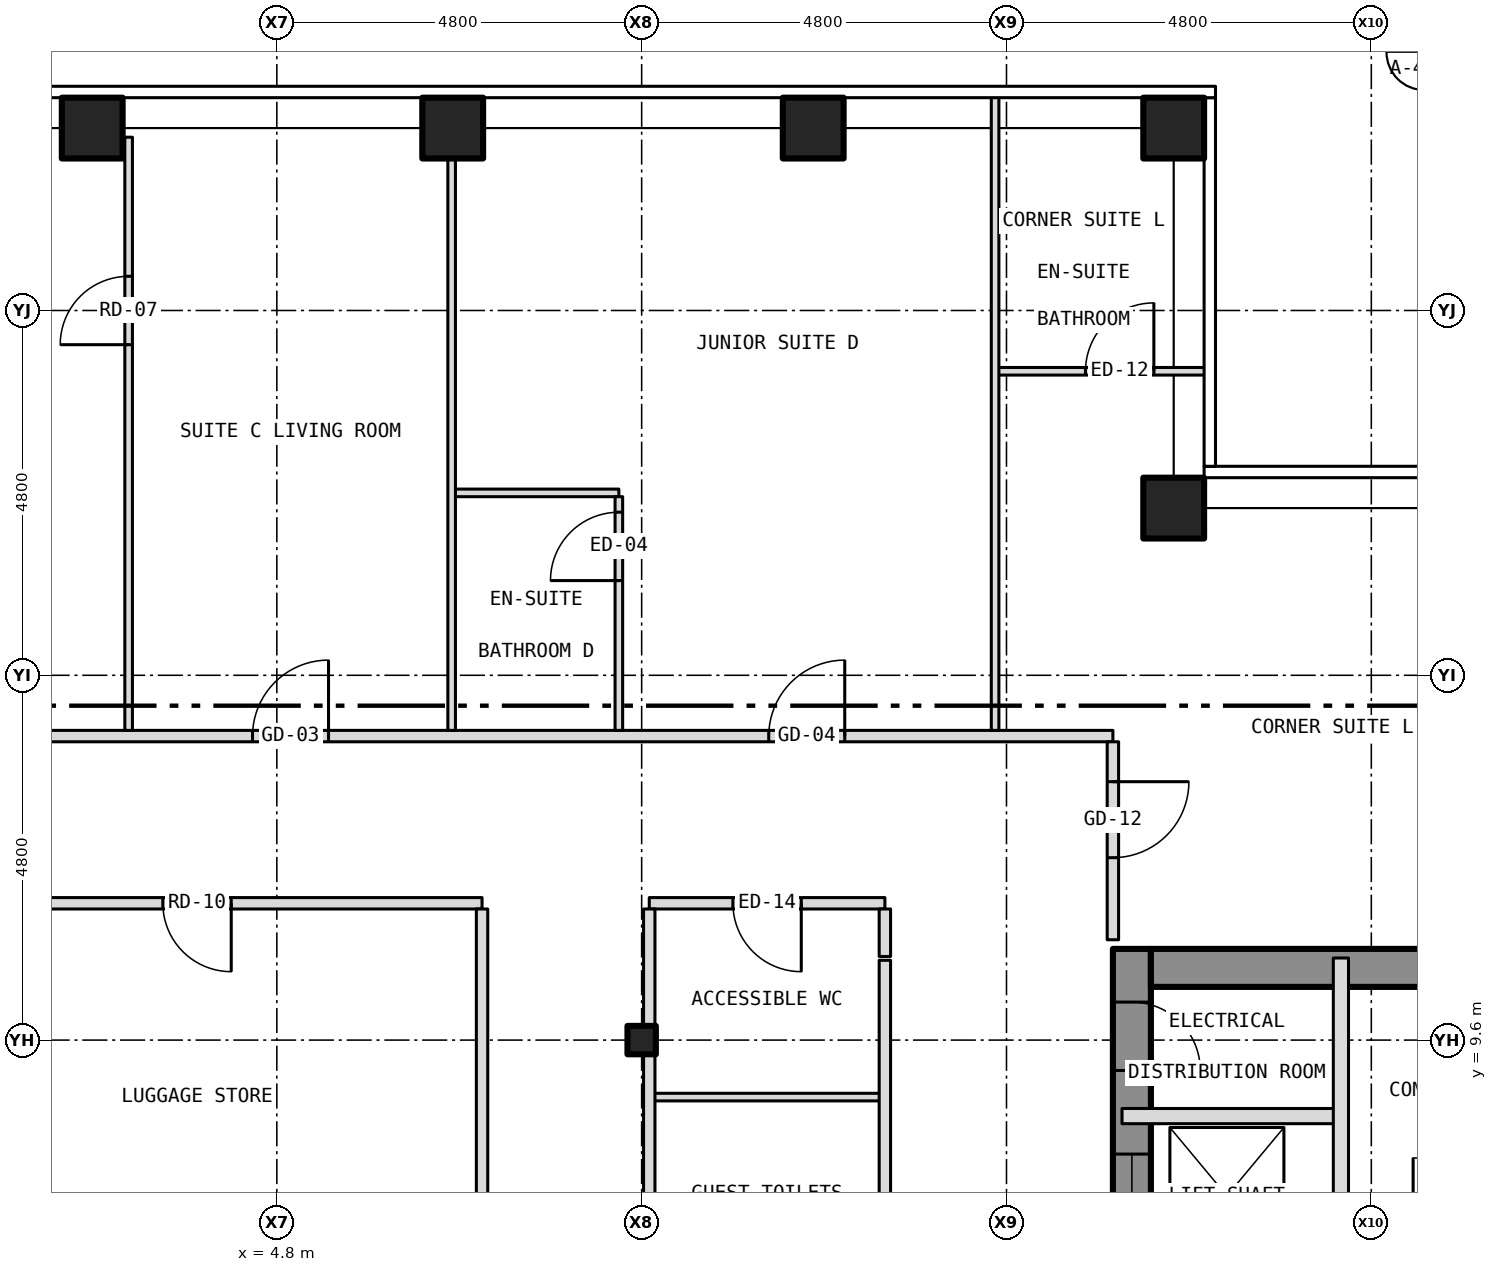
"""IFC4 building model, lengths in metres.
Left out: names, types, materials, properties, quantities, classifications, styles, units other than length and angle.
Written with IfcOpenShell. Run it as: python <this file> out.ifc"""

import sys

from ifc_helpers import new_model, si_unit, direction, frame, frame_2d, origin, origin_2d, place, context, subcontext, project, spatial, rectangle, hollow_rectangle, i_section, extrude, element, fill, save


model = new_model("IFC4")
c1 = context("Model", 3, precision=1e-05, world=origin(), true_north=direction((0.0, 1.0)))
c2 = subcontext(c1, "Body", "Model", "MODEL_VIEW")
j1 = project(units=[si_unit("LENGTHUNIT", "METRE"), si_unit("PLANEANGLEUNIT", "RADIAN")], contexts=[c1])
p1 = place(None, origin())
s1 = spatial("IfcSite", under=j1, at=p1, CompositionType="ELEMENT")
p2 = place(p1, origin())
s2 = spatial("IfcBuilding", under=s1, at=p2, CompositionType="ELEMENT")
p3 = place(p2, frame((0.0, 0.0, 176.0)))
s3 = spatial("IfcBuildingStorey", under=s2, at=p3, CompositionType="ELEMENT", Elevation=176.0)
for number, where, z_axis, x_axis in (
    (1, (2.371, 21.6, -0.15), (0.0, 0.0, 1.0), (1.0, 0.0, 0.0)),
    (2, (7.114, 21.6, -0.15), (0.0, 0.0, 1.0), (1.0, 0.0, 0.0)),
    (3, (11.857, 21.6, -0.15), (0.0, 0.0, 1.0), (1.0, 0.0, 0.0)),
    (4, (16.6, 21.6, -0.15), (0.0, 0.0, 1.0), (1.0, 0.0, 0.0)),
    (5, (16.6, 16.6, -0.15), (0.0, 0.0, 1.0), (1.0, 0.0, 0.0)),
):
    element("IfcColumn", number, at=place(p3, frame(where, z_axis=z_axis, x_axis=x_axis)), inside=s3, PredefinedType="COLUMN", context=c2, shape_type="SweptSolid", body=[
        extrude(hollow_rectangle(XDim=0.8, YDim=0.8, WallThickness=0.045, at=origin_2d()), origin(), (0.0, 0.0, 1.0), 3.5),
    ])
p4 = place(p3, frame((9.6, 9.6, -0.15), z_axis=(0.0, 0.0, 1.0), x_axis=(1.0, 0.0, 0.0)))
e6 = element("IfcColumn", 6, at=p4, inside=s3, PredefinedType="COLUMN", context=c2, shape_type="SweptSolid", body=[
    extrude(i_section(OverallWidth=0.373, OverallDepth=0.373, WebThickness=0.016, FlangeThickness=0.026, at=origin_2d()), origin(), (0.0, 0.0, 1.0), 3.5),
])
p5 = place(p3, frame((16.05, -10.8, 0.0), z_axis=(0.0, 0.0, 1.0), x_axis=(0.0, 1.0, 0.0)))
e7 = element("IfcWall", 7, at=p5, inside=s3, PredefinedType="SHEAR", context=c2, shape_type="SweptSolid", body=[
    extrude(rectangle(XDim=21.6, YDim=0.5, at=frame_2d((10.8, 0.0))), origin(), (0.0, 0.0, 1.0), 3.25),
])
p6 = place(p5, frame((9.4, 0.0, 0.0)))
e8 = element("IfcOpeningElement", 8, at=p6, cuts=e7, PredefinedType="OPENING", context=c2, shape_type="SweptSolid", body=[
    extrude(rectangle(XDim=1.1, YDim=2.1, at=frame_2d((0.55, 1.05))), frame((0.0, 0.262, 0.0), z_axis=(0.0, -1.0, 0.0), x_axis=(1.0, 0.0, 0.0)), (0.0, 0.0, 1.0), 0.524),
])
p7 = place(p5, frame((11.5, 0.0, 0.0)))
e9 = element("IfcOpeningElement", 9, at=p7, cuts=e7, PredefinedType="OPENING", context=c2, shape_type="SweptSolid", body=[
    extrude(rectangle(XDim=1.1, YDim=2.1, at=frame_2d((0.55, 1.05))), frame((0.0, 0.262, 0.0), z_axis=(0.0, -1.0, 0.0), x_axis=(1.0, 0.0, 0.0)), (0.0, 0.0, 1.0), 0.524),
])
p8 = place(p5, frame((13.6, 0.0, 0.0)))
e10 = element("IfcOpeningElement", 10, at=p8, cuts=e7, PredefinedType="OPENING", context=c2, shape_type="SweptSolid", body=[
    extrude(rectangle(XDim=1.1, YDim=2.1, at=frame_2d((0.55, 1.05))), frame((0.0, 0.262, 0.0), z_axis=(0.0, -1.0, 0.0), x_axis=(1.0, 0.0, 0.0)), (0.0, 0.0, 1.0), 0.524),
])
p9 = place(p5, frame((15.7, 0.0, 0.0)))
e11 = element("IfcOpeningElement", 11, at=p9, cuts=e7, PredefinedType="OPENING", context=c2, shape_type="SweptSolid", body=[
    extrude(rectangle(XDim=1.1, YDim=2.1, at=frame_2d((0.55, 1.05))), frame((0.0, 0.262, 0.0), z_axis=(0.0, -1.0, 0.0), x_axis=(1.0, 0.0, 0.0)), (0.0, 0.0, 1.0), 0.524),
])
p10 = place(p5, frame((17.8, 0.0, 0.0)))
e12 = element("IfcOpeningElement", 12, at=p10, cuts=e7, PredefinedType="OPENING", context=c2, shape_type="SweptSolid", body=[
    extrude(rectangle(XDim=1.1, YDim=2.1, at=frame_2d((0.55, 1.05))), frame((0.0, 0.262, 0.0), z_axis=(0.0, -1.0, 0.0), x_axis=(1.0, 0.0, 0.0)), (0.0, 0.0, 1.0), 0.524),
])
p11 = place(p5, frame((5.642, 0.0, 0.0)))
e13 = element("IfcOpeningElement", 13, at=p11, cuts=e7, PredefinedType="OPENING", context=c2, shape_type="SweptSolid", body=[
    extrude(rectangle(XDim=1.1, YDim=2.1, at=frame_2d((0.55, 1.05))), frame((0.0, 0.262, 0.0), z_axis=(0.0, -1.0, 0.0), x_axis=(1.0, 0.0, 0.0)), (0.0, 0.0, 1.0), 0.524),
])
p12 = place(p5, frame((7.5, 0.0, 0.0)))
e14 = element("IfcOpeningElement", 14, at=p12, cuts=e7, PredefinedType="OPENING", context=c2, shape_type="SweptSolid", body=[
    extrude(rectangle(XDim=1.1, YDim=2.1, at=frame_2d((0.55, 1.05))), frame((0.0, 0.262, 0.0), z_axis=(0.0, -1.0, 0.0), x_axis=(1.0, 0.0, 0.0)), (0.0, 0.0, 1.0), 0.524),
])
p13 = place(p5, frame((20.0, 0.0, 0.0)))
e15 = element("IfcOpeningElement", 15, at=p13, cuts=e7, PredefinedType="OPENING", context=c2, shape_type="SweptSolid", body=[
    extrude(rectangle(XDim=0.9, YDim=2.1, at=frame_2d((0.45, 1.05))), frame((0.0, 0.262, 0.0), z_axis=(0.0, -1.0, 0.0), x_axis=(1.0, 0.0, 0.0)), (0.0, 0.0, 1.0), 0.524),
])
p14 = place(p3, frame((16.3, 10.55, 0.0), z_axis=(0.0, 0.0, 1.0), x_axis=(1.0, 0.0, 0.0)))
e16 = element("IfcWall", 16, at=p14, inside=s3, PredefinedType="SHEAR", context=c2, shape_type="SweptSolid", body=[
    extrude(rectangle(XDim=4.8, YDim=0.5, at=frame_2d((2.4, 0.0))), origin(), (0.0, 0.0, 1.0), 3.25),
])
p15 = place(p3, frame((15.92, 8.6, 0.0), z_axis=(0.0, 0.0, 1.0), x_axis=(1.0, 0.0, 0.0)))
e17 = element("IfcWall", 17, at=p15, inside=s3, PredefinedType="PARTITIONING", context=c2, shape_type="SweptSolid", body=[
    extrude(rectangle(XDim=2.88, YDim=0.2, at=frame_2d((1.44, 0.0))), origin(), (0.0, 0.0, 1.0), 3.25),
])
p16 = place(p3, frame((9.7, 8.85, 0.0), z_axis=(0.0, 0.0, 1.0), x_axis=(1.0, 0.0, 0.0)))
e18 = element("IfcWall", 18, at=p16, inside=s3, PredefinedType="PARTITIONING", context=c2, shape_type="SweptSolid", body=[
    extrude(rectangle(XDim=3.1, YDim=0.1, at=frame_2d((1.55, 0.0))), origin(), (0.0, 0.0, 1.0), 3.35),
])
p17 = place(p3, frame((-12.8, 11.4, 0.0), z_axis=(0.0, 0.0, 1.0), x_axis=(1.0, 0.0, 0.0)))
e19 = element("IfcWall", 19, at=p17, inside=s3, PredefinedType="PARTITIONING", context=c2, shape_type="SweptSolid", body=[
    extrude(rectangle(XDim=20.3, YDim=0.15, at=frame_2d((10.15, 0.0))), origin(), (0.0, 0.0, 1.0), 3.35),
])
p18 = place(p17, frame((1.15, 0.0, 0.0)))
e20 = element("IfcOpeningElement", 20, at=p18, cuts=e19, PredefinedType="OPENING", context=c2, shape_type="SweptSolid", body=[
    extrude(rectangle(XDim=0.9, YDim=2.1, at=frame_2d((0.45, 1.05))), frame((0.0, 0.087, 0.0), z_axis=(0.0, -1.0, 0.0), x_axis=(1.0, 0.0, 0.0)), (0.0, 0.0, 1.0), 0.174),
])
p19 = place(p17, frame((16.1, 0.0, 0.0)))
e21 = element("IfcOpeningElement", 21, at=p19, cuts=e19, PredefinedType="OPENING", context=c2, shape_type="SweptSolid", body=[
    extrude(rectangle(XDim=0.9, YDim=2.1, at=frame_2d((0.45, 1.05))), frame((0.0, 0.087, 0.0), z_axis=(0.0, -1.0, 0.0), x_axis=(1.0, 0.0, 0.0)), (0.0, 0.0, 1.0), 0.174),
])
p20 = place(p17, frame((7.55, 0.0, 0.0)))
e22 = element("IfcOpeningElement", 22, at=p20, cuts=e19, PredefinedType="OPENING", context=c2, shape_type="SweptSolid", body=[
    extrude(rectangle(XDim=0.9, YDim=2.1, at=frame_2d((0.45, 1.05))), frame((0.0, 0.087, 0.0), z_axis=(0.0, -1.0, 0.0), x_axis=(1.0, 0.0, 0.0)), (0.0, 0.0, 1.0), 0.174),
])
p21 = place(p3, frame((9.7, 11.4, 0.0), z_axis=(0.0, 0.0, 1.0), x_axis=(1.0, 0.0, 0.0)))
e23 = element("IfcWall", 23, at=p21, inside=s3, PredefinedType="PARTITIONING", context=c2, shape_type="SweptSolid", body=[
    extrude(rectangle(XDim=3.1, YDim=0.15, at=frame_2d((1.55, 0.0))), origin(), (0.0, 0.0, 1.0), 3.35),
])
p22 = place(p21, frame((1.1, 0.0, 0.0)))
e24 = element("IfcOpeningElement", 24, at=p22, cuts=e23, PredefinedType="OPENING", context=c2, shape_type="SweptSolid", body=[
    extrude(rectangle(XDim=0.9, YDim=2.1, at=frame_2d((0.45, 1.05))), frame((0.0, 0.087, 0.0), z_axis=(0.0, -1.0, 0.0), x_axis=(1.0, 0.0, 0.0)), (0.0, 0.0, 1.0), 0.174),
])
p23 = place(p3, frame((-15.8, 13.6, 0.0), z_axis=(0.0, 0.0, 1.0), x_axis=(1.0, 0.0, 0.0)))
e25 = element("IfcWall", 25, at=p23, inside=s3, PredefinedType="PARTITIONING", context=c2, shape_type="SweptSolid", body=[
    extrude(rectangle(XDim=31.6, YDim=0.15, at=frame_2d((15.8, 0.0))), origin(), (0.0, 0.0, 1.0), 3.35),
])
p24 = place(p23, frame((4.543, 0.0, 0.0)))
e26 = element("IfcOpeningElement", 26, at=p24, cuts=e25, PredefinedType="OPENING", context=c2, shape_type="SweptSolid", body=[
    extrude(rectangle(XDim=1.0, YDim=2.1, at=frame_2d((0.5, 1.05))), frame((0.0, 0.087, 0.0), z_axis=(0.0, -1.0, 0.0), x_axis=(1.0, 0.0, 0.0)), (0.0, 0.0, 1.0), 0.174),
])
p25 = place(p23, frame((8.271, 0.0, 0.0)))
e27 = element("IfcOpeningElement", 27, at=p25, cuts=e25, PredefinedType="OPENING", context=c2, shape_type="SweptSolid", body=[
    extrude(rectangle(XDim=1.0, YDim=2.1, at=frame_2d((0.5, 1.05))), frame((0.0, 0.087, 0.0), z_axis=(0.0, -1.0, 0.0), x_axis=(1.0, 0.0, 0.0)), (0.0, 0.0, 1.0), 0.174),
])
p26 = place(p23, frame((20.28, 0.0, 0.0)))
e28 = element("IfcOpeningElement", 28, at=p26, cuts=e25, PredefinedType="OPENING", context=c2, shape_type="SweptSolid", body=[
    extrude(rectangle(XDim=1.0, YDim=2.1, at=frame_2d((0.5, 1.05))), frame((0.0, 0.087, 0.0), z_axis=(0.0, -1.0, 0.0), x_axis=(1.0, 0.0, 0.0)), (0.0, 0.0, 1.0), 0.174),
])
p27 = place(p23, frame((27.072, 0.0, 0.0)))
e29 = element("IfcOpeningElement", 29, at=p27, cuts=e25, PredefinedType="OPENING", context=c2, shape_type="SweptSolid", body=[
    extrude(rectangle(XDim=1.0, YDim=2.1, at=frame_2d((0.5, 1.05))), frame((0.0, 0.087, 0.0), z_axis=(0.0, -1.0, 0.0), x_axis=(1.0, 0.0, 0.0)), (0.0, 0.0, 1.0), 0.174),
])
p28 = place(p3, frame((7.1, 16.8, 0.0), z_axis=(0.0, 0.0, 1.0), x_axis=(1.0, 0.0, 0.0)))
e30 = element("IfcWall", 30, at=p28, inside=s3, PredefinedType="PARTITIONING", context=c2, shape_type="SweptSolid", body=[
    extrude(rectangle(XDim=2.2, YDim=0.1, at=frame_2d((1.1, 0.0))), origin(), (0.0, 0.0, 1.0), 3.35),
])
p29 = place(p3, frame((14.25, 18.4, 0.0), z_axis=(0.0, 0.0, 1.0), x_axis=(1.0, 0.0, 0.0)))
e31 = element("IfcWall", 31, at=p29, inside=s3, PredefinedType="PARTITIONING", context=c2, shape_type="SweptSolid", body=[
    extrude(rectangle(XDim=2.78, YDim=0.1, at=frame_2d((1.39, 0.0))), origin(), (0.0, 0.0, 1.0), 3.35),
])
p30 = place(p29, frame((1.189, 0.0, 0.0)))
e32 = element("IfcOpeningElement", 32, at=p30, cuts=e31, PredefinedType="OPENING", context=c2, shape_type="SweptSolid", body=[
    extrude(rectangle(XDim=0.9, YDim=2.1, at=frame_2d((0.45, 1.05))), frame((0.0, 0.062, 0.0), z_axis=(0.0, -1.0, 0.0), x_axis=(1.0, 0.0, 0.0)), (0.0, 0.0, 1.0), 0.124),
])
p31 = place(p3, frame((2.85, 13.675, 0.0), z_axis=(0.0, 0.0, 1.0), x_axis=(0.0, 1.0, 0.0)))
e33 = element("IfcWall", 33, at=p31, inside=s3, PredefinedType="PARTITIONING", context=c2, shape_type="SweptSolid", body=[
    extrude(rectangle(XDim=7.805, YDim=0.1, at=frame_2d((3.902, 0.0))), origin(), (0.0, 0.0, 1.0), 3.35),
])
p32 = place(p31, frame((5.075, 0.0, 0.0)))
e34 = element("IfcOpeningElement", 34, at=p32, cuts=e33, PredefinedType="OPENING", context=c2, shape_type="SweptSolid", body=[
    extrude(rectangle(XDim=0.9, YDim=2.1, at=frame_2d((0.45, 1.05))), frame((0.0, 0.062, 0.0), z_axis=(0.0, -1.0, 0.0), x_axis=(1.0, 0.0, 0.0)), (0.0, 0.0, 1.0), 0.124),
])
p33 = place(p3, frame((7.1, 13.675, 0.0), z_axis=(0.0, 0.0, 1.0), x_axis=(0.0, 1.0, 0.0)))
e35 = element("IfcWall", 35, at=p33, inside=s3, PredefinedType="PARTITIONING", context=c2, shape_type="SweptSolid", body=[
    extrude(rectangle(XDim=7.805, YDim=0.1, at=frame_2d((3.902, 0.0))), origin(), (0.0, 0.0, 1.0), 3.35),
])
p34 = place(p3, frame((7.5, 6.375, 0.0), z_axis=(0.0, 0.0, 1.0), x_axis=(0.0, 1.0, 0.0)))
e36 = element("IfcWall", 36, at=p34, inside=s3, PredefinedType="PARTITIONING", context=c2, shape_type="SweptSolid", body=[
    extrude(rectangle(XDim=4.95, YDim=0.15, at=frame_2d((2.475, 0.0))), origin(), (0.0, 0.0, 1.0), 3.35),
])
p35 = place(p3, frame((9.3, 13.675, 0.0), z_axis=(0.0, 0.0, 1.0), x_axis=(0.0, 1.0, 0.0)))
e37 = element("IfcWall", 37, at=p35, inside=s3, PredefinedType="PARTITIONING", context=c2, shape_type="SweptSolid", body=[
    extrude(rectangle(XDim=3.075, YDim=0.1, at=frame_2d((1.538, 0.0))), origin(), (0.0, 0.0, 1.0), 3.35),
])
p36 = place(p35, frame((1.971, 0.0, 0.0)))
e38 = element("IfcOpeningElement", 38, at=p36, cuts=e37, PredefinedType="OPENING", context=c2, shape_type="SweptSolid", body=[
    extrude(rectangle(XDim=0.9, YDim=2.1, at=frame_2d((0.45, 1.05))), frame((0.0, 0.062, 0.0), z_axis=(0.0, -1.0, 0.0), x_axis=(1.0, 0.0, 0.0)), (0.0, 0.0, 1.0), 0.124),
])
p37 = place(p3, frame((9.7, 6.375, 0.0), z_axis=(0.0, 0.0, 1.0), x_axis=(0.0, 1.0, 0.0)))
e39 = element("IfcWall", 39, at=p37, inside=s3, PredefinedType="PARTITIONING", context=c2, shape_type="SweptSolid", body=[
    extrude(rectangle(XDim=3.038, YDim=0.15, at=frame_2d((1.519, 0.0))), origin(), (0.0, 0.0, 1.0), 2.728),
])
p38 = place(p3, frame((9.7, 9.413, 0.0), z_axis=(0.0, 0.0, 1.0), x_axis=(0.0, 1.0, 0.0)))
e40 = element("IfcWall", 40, at=p38, inside=s3, PredefinedType="PARTITIONING", context=c2, shape_type="SweptSolid", body=[
    extrude(rectangle(XDim=0.374, YDim=0.15, at=frame_2d((0.187, 0.0))), origin(), (0.0, 0.0, 1.0), 3.35),
])
p39 = place(p3, frame((9.7, 9.787, 0.0), z_axis=(0.0, 0.0, 1.0), x_axis=(0.0, 1.0, 0.0)))
e41 = element("IfcWall", 41, at=p39, inside=s3, PredefinedType="PARTITIONING", context=c2, shape_type="SweptSolid", body=[
    extrude(rectangle(XDim=1.538, YDim=0.15, at=frame_2d((0.769, 0.0))), origin(), (0.0, 0.0, 1.0), 2.728),
])
p40 = place(p3, frame((12.8, 6.35, 0.0), z_axis=(0.0, 0.0, 1.0), x_axis=(0.0, 1.0, 0.0)))
e42 = element("IfcWall", 42, at=p40, inside=s3, PredefinedType="PARTITIONING", context=c2, shape_type="SweptSolid", body=[
    extrude(rectangle(XDim=4.3, YDim=0.15, at=frame_2d((2.15, 0.0))), origin(), (0.0, 0.0, 1.0), 3.35),
])
p41 = place(p3, frame((12.8, 10.7, 0.0), z_axis=(0.0, 0.0, 1.0), x_axis=(0.0, 1.0, 0.0)))
e43 = element("IfcWall", 43, at=p41, inside=s3, PredefinedType="PARTITIONING", context=c2, shape_type="SweptSolid", body=[
    extrude(rectangle(XDim=0.625, YDim=0.15, at=frame_2d((0.312, 0.0))), origin(), (0.0, 0.0, 1.0), 3.35),
])
p42 = place(p3, frame((14.25, 13.675, 0.0), z_axis=(0.0, 0.0, 1.0), x_axis=(0.0, 1.0, 0.0)))
e44 = element("IfcWall", 44, at=p42, inside=s3, PredefinedType="PARTITIONING", context=c2, shape_type="SweptSolid", body=[
    extrude(rectangle(XDim=8.355, YDim=0.1, at=frame_2d((4.177, 0.0))), origin(), (0.0, 0.0, 1.0), 2.817),
])
p43 = place(p3, frame((15.8, 10.92, 0.0), z_axis=(0.0, 0.0, 1.0), x_axis=(0.0, 1.0, 0.0)))
e45 = element("IfcWall", 45, at=p43, inside=s3, PredefinedType="PARTITIONING", context=c2, shape_type="SweptSolid", body=[
    extrude(rectangle(XDim=2.605, YDim=0.15, at=frame_2d((1.302, 0.0))), origin(), (0.0, 0.0, 1.0), 3.35),
])
p44 = place(p43, frame((1.08, 0.0, 0.0)))
e46 = element("IfcOpeningElement", 46, at=p44, cuts=e45, PredefinedType="OPENING", context=c2, shape_type="SweptSolid", body=[
    extrude(rectangle(XDim=1.0, YDim=2.1, at=frame_2d((0.5, 1.05))), frame((0.0, 0.087, 0.0), z_axis=(0.0, -1.0, 0.0), x_axis=(1.0, 0.0, 0.0)), (0.0, 0.0, 1.0), 0.174),
])
p45 = place(p3, frame((18.8, -1.8, 0.0), z_axis=(0.0, 0.0, 1.0), x_axis=(0.0, 1.0, 0.0)))
e47 = element("IfcWall", 47, at=p45, inside=s3, PredefinedType="PARTITIONING", context=c2, shape_type="SweptSolid", body=[
    extrude(rectangle(XDim=12.48, YDim=0.2, at=frame_2d((6.24, 0.0))), origin(), (0.0, 0.0, 1.0), 3.25),
])
p46 = place(p10, origin())
e48 = element("IfcDoor", 48, at=p46, inside=s3, OperationType="SLIDING_TO_LEFT", PredefinedType="DOOR", context=c2, shape_type="SweptSolid", body=[
    extrude(rectangle(XDim=1.1, YDim=2.1, at=frame_2d((0.55, 1.05))), frame((0.0, 0.025, 0.0), z_axis=(0.0, -1.0, 0.0), x_axis=(1.0, 0.0, 0.0)), (0.0, 0.0, 1.0), 0.05),
])
fill(e12, e48)
p47 = place(p13, origin())
e49 = element("IfcDoor", 49, at=p47, inside=s3, OperationType="SINGLE_SWING_LEFT", PredefinedType="DOOR", context=c2, shape_type="SweptSolid", body=[
    extrude(rectangle(XDim=0.9, YDim=2.1, at=frame_2d((0.45, 1.05))), frame((0.0, 0.025, 0.0), z_axis=(0.0, -1.0, 0.0), x_axis=(1.0, 0.0, 0.0)), (0.0, 0.0, 1.0), 0.05),
])
fill(e15, e49)
p48 = place(p26, origin())
e50 = element("IfcDoor", 50, at=p48, inside=s3, OperationType="SINGLE_SWING_RIGHT", PredefinedType="DOOR", context=c2, shape_type="SweptSolid", body=[
    extrude(rectangle(XDim=1.0, YDim=2.1, at=frame_2d((0.5, 1.05))), frame((0.0, 0.025, 0.0), z_axis=(0.0, -1.0, 0.0), x_axis=(1.0, 0.0, 0.0)), (0.0, 0.0, 1.0), 0.05),
])
fill(e28, e50)
p49 = place(p32, origin())
e51 = element("IfcDoor", 51, at=p49, inside=s3, OperationType="SINGLE_SWING_LEFT", PredefinedType="DOOR", context=c2, shape_type="SweptSolid", body=[
    extrude(rectangle(XDim=0.9, YDim=2.1, at=frame_2d((0.45, 1.05))), frame((0.0, 0.025, 0.0), z_axis=(0.0, -1.0, 0.0), x_axis=(1.0, 0.0, 0.0)), (0.0, 0.0, 1.0), 0.05),
])
fill(e34, e51)
p50 = place(p27, origin())
e52 = element("IfcDoor", 52, at=p50, inside=s3, OperationType="SINGLE_SWING_RIGHT", PredefinedType="DOOR", context=c2, shape_type="SweptSolid", body=[
    extrude(rectangle(XDim=1.0, YDim=2.1, at=frame_2d((0.5, 1.05))), frame((0.0, 0.025, 0.0), z_axis=(0.0, -1.0, 0.0), x_axis=(1.0, 0.0, 0.0)), (0.0, 0.0, 1.0), 0.05),
])
fill(e29, e52)
p51 = place(p36, origin())
e53 = element("IfcDoor", 53, at=p51, inside=s3, OperationType="SINGLE_SWING_LEFT", PredefinedType="DOOR", context=c2, shape_type="SweptSolid", body=[
    extrude(rectangle(XDim=0.9, YDim=2.1, at=frame_2d((0.45, 1.05))), frame((0.0, 0.025, 0.0), z_axis=(0.0, -1.0, 0.0), x_axis=(1.0, 0.0, 0.0)), (0.0, 0.0, 1.0), 0.05),
])
fill(e38, e53)
p52 = place(p30, origin())
e54 = element("IfcDoor", 54, at=p52, inside=s3, OperationType="SINGLE_SWING_RIGHT", PredefinedType="DOOR", context=c2, shape_type="SweptSolid", body=[
    extrude(rectangle(XDim=0.9, YDim=2.1, at=frame_2d((0.45, 1.05))), frame((0.0, 0.025, 0.0), z_axis=(0.0, -1.0, 0.0), x_axis=(1.0, 0.0, 0.0)), (0.0, 0.0, 1.0), 0.05),
])
fill(e32, e54)
p53 = place(p44, origin())
e55 = element("IfcDoor", 55, at=p53, inside=s3, OperationType="SINGLE_SWING_RIGHT", PredefinedType="DOOR", context=c2, shape_type="SweptSolid", body=[
    extrude(rectangle(XDim=1.0, YDim=2.1, at=frame_2d((0.5, 1.05))), frame((0.0, 0.025, 0.0), z_axis=(0.0, -1.0, 0.0), x_axis=(1.0, 0.0, 0.0)), (0.0, 0.0, 1.0), 0.05),
])
fill(e46, e55)
p54 = place(p22, origin())
e56 = element("IfcDoor", 56, at=p54, inside=s3, OperationType="SINGLE_SWING_RIGHT", PredefinedType="DOOR", context=c2, shape_type="SweptSolid", body=[
    extrude(rectangle(XDim=0.9, YDim=2.1, at=frame_2d((0.45, 1.05))), frame((0.0, 0.025, 0.0), z_axis=(0.0, -1.0, 0.0), x_axis=(1.0, 0.0, 0.0)), (0.0, 0.0, 1.0), 0.05),
])
fill(e24, e56)
p55 = place(p19, origin())
e57 = element("IfcDoor", 57, at=p55, inside=s3, OperationType="SINGLE_SWING_RIGHT", PredefinedType="DOOR", context=c2, shape_type="SweptSolid", body=[
    extrude(rectangle(XDim=0.9, YDim=2.1, at=frame_2d((0.45, 1.05))), frame((0.0, 0.025, 0.0), z_axis=(0.0, -1.0, 0.0), x_axis=(1.0, 0.0, 0.0)), (0.0, 0.0, 1.0), 0.05),
])
fill(e21, e57)
save(model, sys.argv[1])
